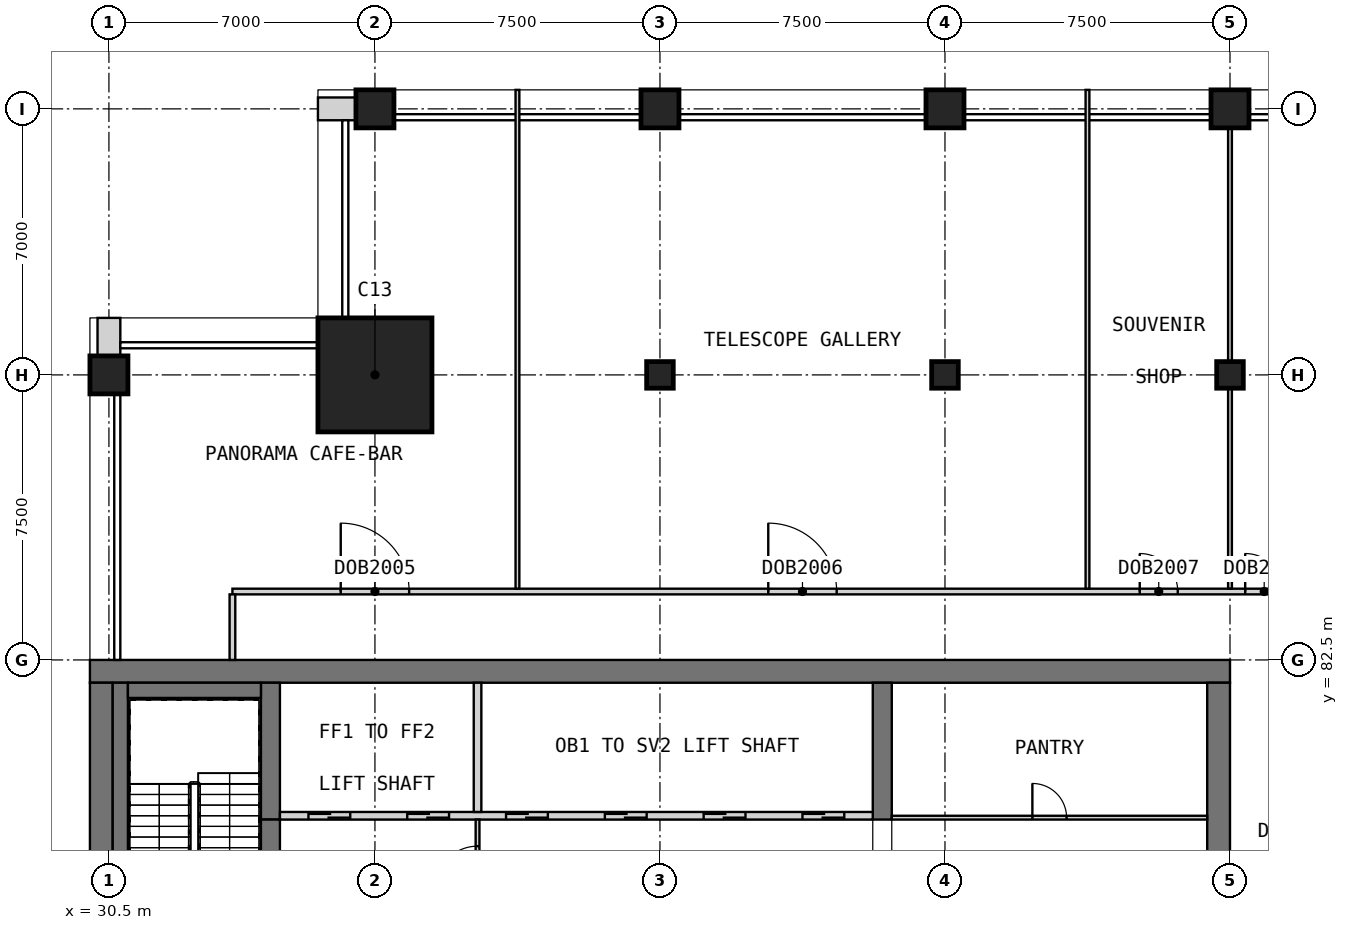
"""IFC4 building model, lengths in metres.
Left out: names, types, materials, properties, quantities, classifications, styles, units other than length and angle.
Written with IfcOpenShell. Run it as: python <this file> out.ifc"""

import sys

from ifc_helpers import new_model, si_unit, direction, frame, frame_2d, origin, origin_2d, place, context, subcontext, project, spatial, rectangle, extrude, element, fill, save


model = new_model("IFC4")
c1 = context("Model", 3, precision=1e-05, world=origin(), true_north=direction((0.0, 1.0)))
c2 = subcontext(c1, "Body", "Model", "MODEL_VIEW")
j1 = project(units=[si_unit("LENGTHUNIT", "METRE"), si_unit("PLANEANGLEUNIT", "RADIAN")], contexts=[c1])
p1 = place(None, origin())
s1 = spatial("IfcSite", under=j1, at=p1, CompositionType="ELEMENT")
p2 = place(p1, origin())
s2 = spatial("IfcBuilding", under=s1, at=p2, CompositionType="ELEMENT")
p3 = place(p2, frame((0.0, 0.0, 308.7)))
s3 = spatial("IfcBuildingStorey", under=s2, at=p3, CompositionType="ELEMENT", Elevation=308.7)
for number, where, z_axis, x_axis in (
    (1, (30.5, 90.0, 0.0), (0.0, 0.0, 1.0), (1.0, 0.0, 0.0)),
    (2, (37.5, 97.0, 0.0), (0.0, 0.0, 1.0), (1.0, 0.0, 0.0)),
):
    element("IfcColumn", number, at=place(p3, frame(where, z_axis=z_axis, x_axis=x_axis)), inside=s3, PredefinedType="COLUMN", context=c2, shape_type="SweptSolid", body=[
        extrude(rectangle(XDim=1.0, YDim=1.0, at=origin_2d()), origin(), (0.0, 0.0, 1.0), 6.0),
    ])
p4 = place(p3, frame((45.0, 90.0, 0.0), z_axis=(0.0, 0.0, 1.0), x_axis=(1.0, 0.0, 0.0)))
e3 = element("IfcColumn", 3, at=p4, inside=s3, PredefinedType="COLUMN", context=c2, shape_type="SweptSolid", body=[
    extrude(rectangle(XDim=0.7, YDim=0.7, at=origin_2d()), origin(), (0.0, 0.0, 1.0), 6.0),
])
p5 = place(p3, frame((45.0, 97.0, 0.0), z_axis=(0.0, 0.0, 1.0), x_axis=(1.0, 0.0, 0.0)))
e4 = element("IfcColumn", 4, at=p5, inside=s3, PredefinedType="COLUMN", context=c2, shape_type="SweptSolid", body=[
    extrude(rectangle(XDim=1.0, YDim=1.0, at=origin_2d()), origin(), (0.0, 0.0, 1.0), 6.0),
])
p6 = place(p3, frame((52.5, 90.0, 0.0), z_axis=(0.0, 0.0, 1.0), x_axis=(1.0, 0.0, 0.0)))
e5 = element("IfcColumn", 5, at=p6, inside=s3, PredefinedType="COLUMN", context=c2, shape_type="SweptSolid", body=[
    extrude(rectangle(XDim=0.7, YDim=0.7, at=origin_2d()), origin(), (0.0, 0.0, 1.0), 6.0),
])
p7 = place(p3, frame((52.5, 97.0, 0.0), z_axis=(0.0, 0.0, 1.0), x_axis=(1.0, 0.0, 0.0)))
e6 = element("IfcColumn", 6, at=p7, inside=s3, PredefinedType="COLUMN", context=c2, shape_type="SweptSolid", body=[
    extrude(rectangle(XDim=1.0, YDim=1.0, at=origin_2d()), origin(), (0.0, 0.0, 1.0), 6.0),
])
p8 = place(p3, frame((60.0, 90.0, 0.0), z_axis=(0.0, 0.0, 1.0), x_axis=(1.0, 0.0, 0.0)))
e7 = element("IfcColumn", 7, at=p8, inside=s3, PredefinedType="COLUMN", context=c2, shape_type="SweptSolid", body=[
    extrude(rectangle(XDim=0.7, YDim=0.7, at=origin_2d()), origin(), (0.0, 0.0, 1.0), 6.0),
])
p9 = place(p3, frame((60.0, 97.0, 0.0), z_axis=(0.0, 0.0, 1.0), x_axis=(1.0, 0.0, 0.0)))
e8 = element("IfcColumn", 8, at=p9, inside=s3, PredefinedType="COLUMN", context=c2, shape_type="SweptSolid", body=[
    extrude(rectangle(XDim=1.0, YDim=1.0, at=origin_2d()), origin(), (0.0, 0.0, 1.0), 6.0),
])
p10 = place(p3, frame((37.5, 90.0, 0.0), z_axis=(0.0, 0.0, 1.0), x_axis=(1.0, 0.0, 0.0)))
e9 = element("IfcColumn", 9, at=p10, inside=s3, PredefinedType="COLUMN", context=c2, shape_type="SweptSolid", body=[
    extrude(rectangle(XDim=3.0, YDim=3.0, at=origin_2d()), origin(), (0.0, 0.0, 1.0), 6.0),
])
p11 = place(p3, frame((30.0, 82.2, 0.0), z_axis=(0.0, 0.0, 1.0), x_axis=(1.0, 0.0, 0.0)))
e10 = element("IfcWall", 10, at=p11, inside=s3, PredefinedType="SHEAR", context=c2, shape_type="SweptSolid", body=[
    extrude(rectangle(XDim=30.0, YDim=0.6, at=frame_2d((15.0, 0.0))), origin(), (0.0, 0.0, 1.0), 6.0),
])
p12 = place(p3, frame((30.3, 60.6, 0.0), z_axis=(0.0, 0.0, 1.0), x_axis=(0.0, 1.0, 0.0)))
e11 = element("IfcWall", 11, at=p12, inside=s3, PredefinedType="SHEAR", context=c2, shape_type="SweptSolid", body=[
    extrude(rectangle(XDim=21.3, YDim=0.6, at=frame_2d((10.65, 0.0))), origin(), (0.0, 0.0, 1.0), 6.0),
])
p13 = place(p3, frame((59.7, 60.6, 0.0), z_axis=(0.0, 0.0, 1.0), x_axis=(0.0, 1.0, 0.0)))
e12 = element("IfcWall", 12, at=p13, inside=s3, PredefinedType="SHEAR", context=c2, shape_type="SweptSolid", body=[
    extrude(rectangle(XDim=21.3, YDim=0.6, at=frame_2d((10.65, 0.0))), origin(), (0.0, 0.0, 1.0), 6.0),
])
p14 = place(p13, frame((14.9, 0.0, 0.0)))
e13 = element("IfcOpeningElement", 13, at=p14, cuts=e12, PredefinedType="OPENING", context=c2, shape_type="SweptSolid", body=[
    extrude(rectangle(XDim=1.8, YDim=2.1, at=frame_2d((0.9, 1.05))), frame((0.0, 0.31, 0.0), z_axis=(0.0, -1.0, 0.0), x_axis=(1.0, 0.0, 0.0)), (0.0, 0.0, 1.0), 0.62),
])
for number, where, z_axis, x_axis in (
    (14, (34.75, 78.3, 0.0), (0.0, 0.0, 1.0), (0.0, 1.0, 0.0)),
    (15, (50.85, 78.3, 0.0), (0.0, 0.0, 1.0), (0.0, 1.0, 0.0)),
):
    element("IfcWall", number, at=place(p3, frame(where, z_axis=z_axis, x_axis=x_axis)), inside=s3, PredefinedType="SHEAR", context=c2, shape_type="SweptSolid", body=[
        extrude(rectangle(XDim=3.6, YDim=0.5, at=frame_2d((1.8, 0.0))), origin(), (0.0, 0.0, 1.0), 6.0),
    ])
p15 = place(p2, frame((0.0, 0.0, 34.0)))
s4 = spatial("IfcBuildingStorey", under=s2, at=p15, CompositionType="ELEMENT", Elevation=34.0)
p16 = place(p15, frame((29.7, 80.55, 0.0), z_axis=(0.0, 0.0, 1.0), x_axis=(0.0, 1.0, 0.0)))
e16 = element("IfcWall", 16, at=p16, inside=s4, PredefinedType="SOLIDWALL", context=c2, shape_type="SweptSolid", body=[
    extrude(rectangle(XDim=0.9, YDim=0.6, at=frame_2d((0.45, 0.0))), origin(), (0.0, 0.0, 1.0), 286.2),
])
for number, where, z_axis, x_axis in (
    (17, (37.0, 97.0, 0.0), (0.0, 0.0, 1.0), (-1.0, 0.0, 0.0)),
    (18, (30.5, 91.5, 0.0), (0.0, 0.0, 1.0), (0.0, -1.0, 0.0)),
):
    element("IfcWall", number, at=place(p3, frame(where, z_axis=z_axis, x_axis=x_axis)), inside=s3, PredefinedType="SOLIDWALL", context=c2, shape_type="SweptSolid", body=[
        extrude(rectangle(XDim=1.0, YDim=0.6, at=frame_2d((0.5, 0.0))), origin(), (0.0, 0.0, 1.0), 5.6),
    ])
p17 = place(p3, frame((35.0, 78.4, 0.0), z_axis=(0.0, 0.0, 1.0), x_axis=(1.0, 0.0, 0.0)))
e19 = element("IfcWall", 19, at=p17, inside=s3, PredefinedType="SOLIDWALL", context=c2, shape_type="SweptSolid", body=[
    extrude(rectangle(XDim=15.6, YDim=0.2, at=frame_2d((7.8, 0.0))), origin(), (0.0, 0.0, 1.0), 6.0),
])
p18 = place(p17, frame((0.75, 0.0, 0.0)))
e20 = element("IfcOpeningElement", 20, at=p18, cuts=e19, PredefinedType="OPENING", context=c2, shape_type="SweptSolid", body=[
    extrude(rectangle(XDim=1.1, YDim=2.1, at=frame_2d((0.55, 1.05))), frame((0.0, 0.11, 0.0), z_axis=(0.0, -1.0, 0.0), x_axis=(1.0, 0.0, 0.0)), (0.0, 0.0, 1.0), 0.22),
])
p19 = place(p17, frame((3.35, 0.0, 0.0)))
e21 = element("IfcOpeningElement", 21, at=p19, cuts=e19, PredefinedType="OPENING", context=c2, shape_type="SweptSolid", body=[
    extrude(rectangle(XDim=1.1, YDim=2.1, at=frame_2d((0.55, 1.05))), frame((0.0, 0.11, 0.0), z_axis=(0.0, -1.0, 0.0), x_axis=(1.0, 0.0, 0.0)), (0.0, 0.0, 1.0), 0.22),
])
p20 = place(p17, frame((5.95, 0.0, 0.0)))
e22 = element("IfcOpeningElement", 22, at=p20, cuts=e19, PredefinedType="OPENING", context=c2, shape_type="SweptSolid", body=[
    extrude(rectangle(XDim=1.1, YDim=2.1, at=frame_2d((0.55, 1.05))), frame((0.0, 0.11, 0.0), z_axis=(0.0, -1.0, 0.0), x_axis=(1.0, 0.0, 0.0)), (0.0, 0.0, 1.0), 0.22),
])
p21 = place(p17, frame((8.55, 0.0, 0.0)))
e23 = element("IfcOpeningElement", 23, at=p21, cuts=e19, PredefinedType="OPENING", context=c2, shape_type="SweptSolid", body=[
    extrude(rectangle(XDim=1.1, YDim=2.1, at=frame_2d((0.55, 1.05))), frame((0.0, 0.11, 0.0), z_axis=(0.0, -1.0, 0.0), x_axis=(1.0, 0.0, 0.0)), (0.0, 0.0, 1.0), 0.22),
])
p22 = place(p17, frame((11.15, 0.0, 0.0)))
e24 = element("IfcOpeningElement", 24, at=p22, cuts=e19, PredefinedType="OPENING", context=c2, shape_type="SweptSolid", body=[
    extrude(rectangle(XDim=1.1, YDim=2.1, at=frame_2d((0.55, 1.05))), frame((0.0, 0.11, 0.0), z_axis=(0.0, -1.0, 0.0), x_axis=(1.0, 0.0, 0.0)), (0.0, 0.0, 1.0), 0.22),
])
p23 = place(p17, frame((13.75, 0.0, 0.0)))
e25 = element("IfcOpeningElement", 25, at=p23, cuts=e19, PredefinedType="OPENING", context=c2, shape_type="SweptSolid", body=[
    extrude(rectangle(XDim=1.1, YDim=2.1, at=frame_2d((0.55, 1.05))), frame((0.0, 0.11, 0.0), z_axis=(0.0, -1.0, 0.0), x_axis=(1.0, 0.0, 0.0)), (0.0, 0.0, 1.0), 0.22),
])
p24 = place(p3, frame((40.2, 78.5, 0.0), z_axis=(0.0, 0.0, 1.0), x_axis=(0.0, 1.0, 0.0)))
e26 = element("IfcWall", 26, at=p24, inside=s3, PredefinedType="SOLIDWALL", context=c2, shape_type="SweptSolid", body=[
    extrude(rectangle(XDim=3.4, YDim=0.2, at=frame_2d((1.7, 0.0))), origin(), (0.0, 0.0, 1.0), 6.0),
])
p25 = place(p3, frame((40.2, 75.3, 0.0), z_axis=(0.0, 0.0, 1.0), x_axis=(0.0, 1.0, 0.0)))
e27 = element("IfcWall", 27, at=p25, inside=s3, PredefinedType="PARTITIONING", context=c2, shape_type="SweptSolid", body=[
    extrude(rectangle(XDim=3.0, YDim=0.1, at=frame_2d((1.5, 0.0))), origin(), (0.0, 0.0, 1.0), 5.59),
])
p26 = place(p25, frame((1.2, 0.0, 0.0)))
e28 = element("IfcOpeningElement", 28, at=p26, cuts=e27, PredefinedType="OPENING", context=c2, shape_type="SweptSolid", body=[
    extrude(rectangle(XDim=1.1, YDim=2.1, at=frame_2d((0.55, 1.05))), frame((0.0, 0.06, 0.0), z_axis=(0.0, -1.0, 0.0), x_axis=(1.0, 0.0, 0.0)), (0.0, 0.0, 1.0), 0.12),
])
p27 = place(p3, frame((34.75, 74.45, 0.0), z_axis=(0.0, 0.0, 1.0), x_axis=(0.0, 1.0, 0.0)))
e29 = element("IfcWall", 29, at=p27, inside=s3, PredefinedType="SOLIDWALL", context=c2, shape_type="SweptSolid", body=[
    extrude(rectangle(XDim=3.85, YDim=0.5, at=frame_2d((1.925, 0.0))), origin(), (0.0, 0.0, 1.0), 4.8),
])
p28 = place(p27, frame((1.0, 0.0, 0.0)))
e30 = element("IfcOpeningElement", 30, at=p28, cuts=e29, PredefinedType="OPENING", context=c2, shape_type="SweptSolid", body=[
    extrude(rectangle(XDim=1.2, YDim=2.1, at=frame_2d((0.6, 1.05))), frame((0.0, 0.26, 0.0), z_axis=(0.0, -1.0, 0.0), x_axis=(1.0, 0.0, 0.0)), (0.0, 0.0, 1.0), 0.52),
])
p29 = place(p3, frame((30.8, 60.6, 0.0), z_axis=(0.0, 0.0, 1.0), x_axis=(0.0, 1.0, 0.0)))
e31 = element("IfcWall", 31, at=p29, inside=s3, PredefinedType="SOLIDWALL", context=c2, shape_type="SweptSolid", body=[
    extrude(rectangle(XDim=21.3, YDim=0.4, at=frame_2d((10.65, 0.0))), origin(), (0.0, 0.0, 1.0), 5.59),
])
p30 = place(p3, frame((31.0, 81.7, 0.0), z_axis=(0.0, 0.0, 1.0), x_axis=(1.0, 0.0, 0.0)))
e32 = element("IfcWall", 32, at=p30, inside=s3, PredefinedType="SOLIDWALL", context=c2, shape_type="SweptSolid", body=[
    extrude(rectangle(XDim=3.5, YDim=0.4, at=frame_2d((1.75, 0.0))), origin(), (0.0, 0.0, 1.0), 5.59),
])
p31 = place(p3, frame((51.1, 78.35, 0.0), z_axis=(0.0, 0.0, 1.0), x_axis=(1.0, 0.0, 0.0)))
e33 = element("IfcWall", 33, at=p31, inside=s3, PredefinedType="PARTITIONING", context=c2, shape_type="SweptSolid", body=[
    extrude(rectangle(XDim=8.3, YDim=0.1, at=frame_2d((4.15, 0.0))), origin(), (0.0, 0.0, 1.0), 5.59),
])
p32 = place(p31, frame((3.7, 0.0, 0.0)))
e34 = element("IfcOpeningElement", 34, at=p32, cuts=e33, PredefinedType="OPENING", context=c2, shape_type="SweptSolid", body=[
    extrude(rectangle(XDim=0.9, YDim=2.1, at=frame_2d((0.45, 1.05))), frame((0.0, 0.06, 0.0), z_axis=(0.0, -1.0, 0.0), x_axis=(1.0, 0.0, 0.0)), (0.0, 0.0, 1.0), 0.12),
])
p33 = place(p3, frame((33.75, 84.3, 0.0), z_axis=(0.0, 0.0, 1.0), x_axis=(1.0, 0.0, 0.0)))
e35 = element("IfcWall", 35, at=p33, inside=s3, PredefinedType="PARTITIONING", context=c2, shape_type="SweptSolid", body=[
    extrude(rectangle(XDim=28.05, YDim=0.15, at=frame_2d((14.025, 0.0))), origin(), (0.0, 0.0, 1.0), 5.6),
])
p34 = place(p33, frame((2.85, 0.0, 0.0)))
e36 = element("IfcOpeningElement", 36, at=p34, cuts=e35, PredefinedType="OPENING", context=c2, shape_type="SweptSolid", body=[
    extrude(rectangle(XDim=1.8, YDim=2.1, at=frame_2d((0.9, 1.05))), frame((0.0, 0.085, 0.0), z_axis=(0.0, -1.0, 0.0), x_axis=(1.0, 0.0, 0.0)), (0.0, 0.0, 1.0), 0.17),
])
p35 = place(p33, frame((14.1, 0.0, 0.0)))
e37 = element("IfcOpeningElement", 37, at=p35, cuts=e35, PredefinedType="OPENING", context=c2, shape_type="SweptSolid", body=[
    extrude(rectangle(XDim=1.8, YDim=2.1, at=frame_2d((0.9, 1.05))), frame((0.0, 0.085, 0.0), z_axis=(0.0, -1.0, 0.0), x_axis=(1.0, 0.0, 0.0)), (0.0, 0.0, 1.0), 0.17),
])
p36 = place(p33, frame((23.875, 0.0, 0.0)))
e38 = element("IfcOpeningElement", 38, at=p36, cuts=e35, PredefinedType="OPENING", context=c2, shape_type="SweptSolid", body=[
    extrude(rectangle(XDim=1.0, YDim=2.1, at=frame_2d((0.5, 1.05))), frame((0.0, 0.085, 0.0), z_axis=(0.0, -1.0, 0.0), x_axis=(1.0, 0.0, 0.0)), (0.0, 0.0, 1.0), 0.17),
])
p37 = place(p33, frame((26.65, 0.0, 0.0)))
e39 = element("IfcOpeningElement", 39, at=p37, cuts=e35, PredefinedType="OPENING", context=c2, shape_type="SweptSolid", body=[
    extrude(rectangle(XDim=1.0, YDim=2.1, at=frame_2d((0.5, 1.05))), frame((0.0, 0.085, 0.0), z_axis=(0.0, -1.0, 0.0), x_axis=(1.0, 0.0, 0.0)), (0.0, 0.0, 1.0), 0.17),
])
p38 = place(p3, frame((33.75, 82.5, 0.0), z_axis=(0.0, 0.0, 1.0), x_axis=(0.0, 1.0, 0.0)))
e40 = element("IfcWall", 40, at=p38, inside=s3, PredefinedType="PARTITIONING", context=c2, shape_type="SweptSolid", body=[
    extrude(rectangle(XDim=1.725, YDim=0.15, at=frame_2d((0.863, 0.0))), origin(), (0.0, 0.0, 1.0), 5.6),
])
for number, where, z_axis, x_axis in (
    (41, (41.25, 84.375, 0.0), (0.0, 0.0, 1.0), (0.0, 1.0, 0.0)),
    (42, (56.25, 84.375, 0.0), (0.0, 0.0, 1.0), (0.0, 1.0, 0.0)),
    (43, (60.0, 84.375, 0.0), (0.0, 0.0, 1.0), (0.0, 1.0, 0.0)),
):
    element("IfcWall", number, at=place(p3, frame(where, z_axis=z_axis, x_axis=x_axis)), inside=s3, PredefinedType="PARTITIONING", context=c2, shape_type="SweptSolid", body=[
        extrude(rectangle(XDim=13.125, YDim=0.1, at=frame_2d((6.562, 0.0))), origin(), (0.0, 0.0, 1.0), 5.6),
    ])
p39 = place(p18, origin())
e44 = element("IfcDoor", 44, at=p39, inside=s3, OperationType="DOUBLE_DOOR_SLIDING", PredefinedType="DOOR", context=c2, shape_type="SweptSolid", body=[
    extrude(rectangle(XDim=1.1, YDim=2.1, at=frame_2d((0.55, 1.05))), frame((0.0, 0.025, 0.0), z_axis=(0.0, -1.0, 0.0), x_axis=(1.0, 0.0, 0.0)), (0.0, 0.0, 1.0), 0.05),
])
fill(e20, e44)
p40 = place(p19, origin())
e45 = element("IfcDoor", 45, at=p40, inside=s3, OperationType="DOUBLE_DOOR_SLIDING", PredefinedType="DOOR", context=c2, shape_type="SweptSolid", body=[
    extrude(rectangle(XDim=1.1, YDim=2.1, at=frame_2d((0.55, 1.05))), frame((0.0, 0.025, 0.0), z_axis=(0.0, -1.0, 0.0), x_axis=(1.0, 0.0, 0.0)), (0.0, 0.0, 1.0), 0.05),
])
fill(e21, e45)
p41 = place(p20, origin())
e46 = element("IfcDoor", 46, at=p41, inside=s3, OperationType="DOUBLE_DOOR_SLIDING", PredefinedType="DOOR", context=c2, shape_type="SweptSolid", body=[
    extrude(rectangle(XDim=1.1, YDim=2.1, at=frame_2d((0.55, 1.05))), frame((0.0, 0.025, 0.0), z_axis=(0.0, -1.0, 0.0), x_axis=(1.0, 0.0, 0.0)), (0.0, 0.0, 1.0), 0.05),
])
fill(e22, e46)
p42 = place(p21, origin())
e47 = element("IfcDoor", 47, at=p42, inside=s3, OperationType="DOUBLE_DOOR_SLIDING", PredefinedType="DOOR", context=c2, shape_type="SweptSolid", body=[
    extrude(rectangle(XDim=1.1, YDim=2.1, at=frame_2d((0.55, 1.05))), frame((0.0, 0.025, 0.0), z_axis=(0.0, -1.0, 0.0), x_axis=(1.0, 0.0, 0.0)), (0.0, 0.0, 1.0), 0.05),
])
fill(e23, e47)
p43 = place(p22, origin())
e48 = element("IfcDoor", 48, at=p43, inside=s3, OperationType="DOUBLE_DOOR_SLIDING", PredefinedType="DOOR", context=c2, shape_type="SweptSolid", body=[
    extrude(rectangle(XDim=1.1, YDim=2.1, at=frame_2d((0.55, 1.05))), frame((0.0, 0.025, 0.0), z_axis=(0.0, -1.0, 0.0), x_axis=(1.0, 0.0, 0.0)), (0.0, 0.0, 1.0), 0.05),
])
fill(e24, e48)
p44 = place(p23, origin())
e49 = element("IfcDoor", 49, at=p44, inside=s3, OperationType="DOUBLE_DOOR_SLIDING", PredefinedType="DOOR", context=c2, shape_type="SweptSolid", body=[
    extrude(rectangle(XDim=1.1, YDim=2.1, at=frame_2d((0.55, 1.05))), frame((0.0, 0.025, 0.0), z_axis=(0.0, -1.0, 0.0), x_axis=(1.0, 0.0, 0.0)), (0.0, 0.0, 1.0), 0.05),
])
fill(e25, e49)
p45 = place(p26, origin())
e50 = element("IfcDoor", 50, at=p45, inside=s3, OperationType="SINGLE_SWING_LEFT", PredefinedType="DOOR", context=c2, shape_type="SweptSolid", body=[
    extrude(rectangle(XDim=1.1, YDim=2.1, at=frame_2d((0.55, 1.05))), frame((0.0, 0.025, 0.0), z_axis=(0.0, -1.0, 0.0), x_axis=(1.0, 0.0, 0.0)), (0.0, 0.0, 1.0), 0.05),
])
fill(e28, e50)
p46 = place(p32, origin())
e51 = element("IfcDoor", 51, at=p46, inside=s3, OperationType="SINGLE_SWING_RIGHT", PredefinedType="DOOR", context=c2, shape_type="SweptSolid", body=[
    extrude(rectangle(XDim=0.9, YDim=2.1, at=frame_2d((0.45, 1.05))), frame((0.0, 0.025, 0.0), z_axis=(0.0, -1.0, 0.0), x_axis=(1.0, 0.0, 0.0)), (0.0, 0.0, 1.0), 0.05),
])
fill(e34, e51)
p47 = place(p34, origin())
e52 = element("IfcDoor", 52, at=p47, inside=s3, OperationType="DOUBLE_DOOR_SINGLE_SWING", PredefinedType="DOOR", context=c2, shape_type="SweptSolid", body=[
    extrude(rectangle(XDim=1.8, YDim=2.1, at=frame_2d((0.9, 1.05))), frame((0.0, 0.025, 0.0), z_axis=(0.0, -1.0, 0.0), x_axis=(1.0, 0.0, 0.0)), (0.0, 0.0, 1.0), 0.05),
])
fill(e36, e52)
p48 = place(p35, origin())
e53 = element("IfcDoor", 53, at=p48, inside=s3, OperationType="DOUBLE_DOOR_SINGLE_SWING", PredefinedType="DOOR", context=c2, shape_type="SweptSolid", body=[
    extrude(rectangle(XDim=1.8, YDim=2.1, at=frame_2d((0.9, 1.05))), frame((0.0, 0.025, 0.0), z_axis=(0.0, -1.0, 0.0), x_axis=(1.0, 0.0, 0.0)), (0.0, 0.0, 1.0), 0.05),
])
fill(e37, e53)
p49 = place(p36, origin())
e54 = element("IfcDoor", 54, at=p49, inside=s3, OperationType="SINGLE_SWING_LEFT", PredefinedType="DOOR", context=c2, shape_type="SweptSolid", body=[
    extrude(rectangle(XDim=1.0, YDim=2.1, at=frame_2d((0.5, 1.05))), frame((0.0, 0.025, 0.0), z_axis=(0.0, -1.0, 0.0), x_axis=(1.0, 0.0, 0.0)), (0.0, 0.0, 1.0), 0.05),
])
fill(e38, e54)
p50 = place(p37, origin())
e55 = element("IfcDoor", 55, at=p50, inside=s3, OperationType="SINGLE_SWING_LEFT", PredefinedType="DOOR", context=c2, shape_type="SweptSolid", body=[
    extrude(rectangle(XDim=1.0, YDim=2.1, at=frame_2d((0.5, 1.05))), frame((0.0, 0.025, 0.0), z_axis=(0.0, -1.0, 0.0), x_axis=(1.0, 0.0, 0.0)), (0.0, 0.0, 1.0), 0.05),
])
fill(e39, e55)
save(model, sys.argv[1])
